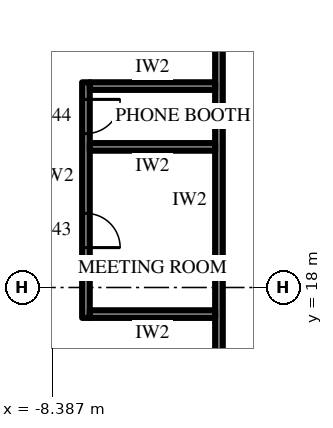
"""IFC4 building model, lengths in metres.
Left out: names, types, materials, properties, quantities, classifications, styles, units other than length and angle.
Written with IfcOpenShell. Run it as: python <this file> out.ifc"""

import sys

from ifc_helpers import new_model, si_unit, direction, frame, frame_2d, origin, place, context, subcontext, project, spatial, rectangle, extrude, element, fill, save


model = new_model("IFC4")
c1 = context("Model", 3, precision=1e-05, world=origin(), true_north=direction((0.0, 1.0)))
c2 = subcontext(c1, "Body", "Model", "MODEL_VIEW")
j1 = project(units=[si_unit("LENGTHUNIT", "METRE"), si_unit("PLANEANGLEUNIT", "RADIAN")], contexts=[c1])
p1 = place(None, origin())
s1 = spatial("IfcSite", under=j1, at=p1, CompositionType="ELEMENT")
p2 = place(p1, origin())
s2 = spatial("IfcBuilding", under=s1, at=p2, CompositionType="ELEMENT")
p3 = place(p2, frame((0.0, 0.0, 73.9)))
s3 = spatial("IfcBuildingStorey", under=s2, at=p3, CompositionType="ELEMENT", Elevation=73.9)
p4 = place(p3, frame((-4.0, 14.2, 0.0), z_axis=(0.0, 0.0, 1.0), x_axis=(0.0, 1.0, 0.0)))
e1 = element("IfcWall", 1, at=p4, inside=s3, PredefinedType="PARTITIONING", context=c2, shape_type="SweptSolid", body=[
    extrude(rectangle(XDim=12.2, YDim=0.2, at=frame_2d((6.1, 0.0))), origin(), (0.0, 0.0, 1.0), 4.0),
])
p5 = place(p4, frame((0.72, 0.0, 0.0)))
e2 = element("IfcOpeningElement", 2, at=p5, cuts=e1, PredefinedType="OPENING", context=c2, shape_type="SweptSolid", body=[
    extrude(rectangle(XDim=1.0, YDim=2.2, at=frame_2d((0.5, 1.1))), frame((0.0, 0.11, 0.0), z_axis=(0.0, -1.0, 0.0), x_axis=(1.0, 0.0, 0.0)), (0.0, 0.0, 1.0), 0.22),
])
p6 = place(p3, frame((-7.5, 17.2, 0.0), z_axis=(0.0, 0.0, 1.0), x_axis=(0.0, 1.0, 0.0)))
e3 = element("IfcWall", 3, at=p6, inside=s3, PredefinedType="PARTITIONING", context=c2, shape_type="SweptSolid", body=[
    extrude(rectangle(XDim=6.2, YDim=0.2, at=frame_2d((3.1, 0.0))), origin(), (0.0, 0.0, 1.0), 4.0),
])
p7 = place(p6, frame((1.85, 0.0, 0.0)))
e4 = element("IfcOpeningElement", 4, at=p7, cuts=e3, PredefinedType="OPENING", context=c2, shape_type="SweptSolid", body=[
    extrude(rectangle(XDim=0.9, YDim=2.2, at=frame_2d((0.45, 1.1))), frame((0.0, 0.11, 0.0), z_axis=(0.0, -1.0, 0.0), x_axis=(1.0, 0.0, 0.0)), (0.0, 0.0, 1.0), 0.22),
])
p8 = place(p6, frame((4.85, 0.0, 0.0)))
e5 = element("IfcOpeningElement", 5, at=p8, cuts=e3, PredefinedType="OPENING", context=c2, shape_type="SweptSolid", body=[
    extrude(rectangle(XDim=0.9, YDim=2.2, at=frame_2d((0.45, 1.1))), frame((0.0, 0.11, 0.0), z_axis=(0.0, -1.0, 0.0), x_axis=(1.0, 0.0, 0.0)), (0.0, 0.0, 1.0), 0.22),
])
for number, where, z_axis, x_axis in (
    (6, (-4.1, 17.3, 0.0), (0.0, 0.0, 1.0), (-1.0, 0.0, 0.0)),
    (7, (-4.1, 21.7, 0.0), (0.0, 0.0, 1.0), (-1.0, 0.0, 0.0)),
    (8, (-4.1, 23.3, 0.0), (0.0, 0.0, 1.0), (-1.0, 0.0, 0.0)),
):
    element("IfcWall", number, at=place(p3, frame(where, z_axis=z_axis, x_axis=x_axis)), inside=s3, PredefinedType="PARTITIONING", context=c2, shape_type="SweptSolid", body=[
        extrude(rectangle(XDim=3.3, YDim=0.2, at=frame_2d((1.65, 0.0))), origin(), (0.0, 0.0, 1.0), 4.0),
    ])
p9 = place(p7, frame((0.9, 0.0, 0.0), z_axis=(0.0, 0.0, 1.0), x_axis=(-1.0, 0.0, 0.0)))
e9 = element("IfcDoor", 9, at=p9, inside=s3, OperationType="SINGLE_SWING_LEFT", PredefinedType="DOOR", context=c2, shape_type="SweptSolid", body=[
    extrude(rectangle(XDim=0.9, YDim=2.2, at=frame_2d((0.45, 1.1))), frame((0.0, 0.025, 0.0), z_axis=(0.0, -1.0, 0.0), x_axis=(1.0, 0.0, 0.0)), (0.0, 0.0, 1.0), 0.05),
])
fill(e4, e9)
p10 = place(p8, frame((0.9, 0.0, 0.0), z_axis=(0.0, 0.0, 1.0), x_axis=(-1.0, 0.0, 0.0)))
e10 = element("IfcDoor", 10, at=p10, inside=s3, OperationType="SINGLE_SWING_RIGHT", PredefinedType="DOOR", context=c2, shape_type="SweptSolid", body=[
    extrude(rectangle(XDim=0.9, YDim=2.2, at=frame_2d((0.45, 1.1))), frame((0.0, 0.025, 0.0), z_axis=(0.0, -1.0, 0.0), x_axis=(1.0, 0.0, 0.0)), (0.0, 0.0, 1.0), 0.05),
])
fill(e5, e10)
save(model, sys.argv[1])
